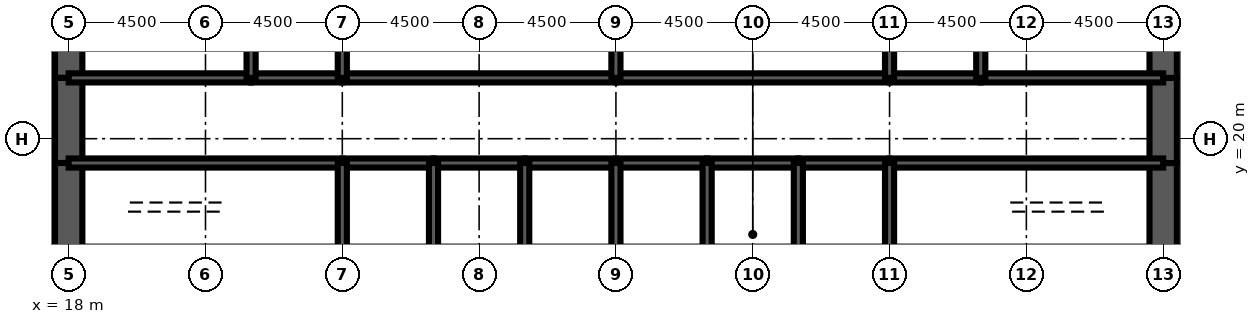
"""IFC4 building model, lengths in metres.
Left out: names, types, materials, properties, quantities, classifications, styles, units other than length and angle.
Written with IfcOpenShell. Run it as: python <this file> out.ifc"""

import sys

from ifc_helpers import new_model, si_unit, direction, frame, frame_2d, origin, place, context, subcontext, project, spatial, rectangle, extrude, element, fill, save


model = new_model("IFC4")
c1 = context("Model", 3, precision=1e-05, world=origin(), true_north=direction((0.0, 1.0)))
c2 = subcontext(c1, "Body", "Model", "MODEL_VIEW")
j1 = project(units=[si_unit("LENGTHUNIT", "METRE"), si_unit("PLANEANGLEUNIT", "RADIAN")], contexts=[c1])
p1 = place(None, origin())
s1 = spatial("IfcSite", under=j1, at=p1, CompositionType="ELEMENT")
p2 = place(p1, origin())
s2 = spatial("IfcBuilding", under=s1, at=p2, CompositionType="ELEMENT")
p3 = place(p2, frame((0.0, 0.0, 176.1)))
s3 = spatial("IfcBuildingStorey", under=s2, at=p3, CompositionType="ELEMENT", Elevation=176.1)
p4 = place(p3, frame((18.0, 26.0, 0.0), z_axis=(0.0, 0.0, 1.0), x_axis=(0.0, -1.0, 0.0)))
e1 = element("IfcWall", 1, at=p4, inside=s3, PredefinedType="SHEAR", context=c2, shape_type="SweptSolid", body=[
    extrude(rectangle(XDim=4.0, YDim=0.9, at=frame_2d((2.0, 0.0))), origin(), (0.0, 0.0, 1.0), 4.2),
])
p5 = place(p3, frame((18.0, 22.0, 0.0), z_axis=(0.0, 0.0, 1.0), x_axis=(0.0, -1.0, 0.0)))
e2 = element("IfcWall", 2, at=p5, inside=s3, PredefinedType="SHEAR", context=c2, shape_type="SweptSolid", body=[
    extrude(rectangle(XDim=2.8, YDim=0.9, at=frame_2d((1.4, 0.0))), origin(), (0.0, 0.0, 1.0), 4.2),
])
p6 = place(p5, frame((0.6, 0.0, 0.0)))
e3 = element("IfcOpeningElement", 3, at=p6, cuts=e2, PredefinedType="OPENING", context=c2, shape_type="SweptSolid", body=[
    extrude(rectangle(XDim=1.8, YDim=2.1, at=frame_2d((0.9, 1.05))), frame((0.0, 0.46, 0.0), z_axis=(0.0, -1.0, 0.0), x_axis=(1.0, 0.0, 0.0)), (0.0, 0.0, 1.0), 0.92),
])
for number, where, z_axis, x_axis in (
    (4, (18.0, 19.2, 0.0), (0.0, 0.0, 1.0), (0.0, -1.0, 0.0)),
    (5, (54.0, 16.0, 0.0), (0.0, 0.0, 1.0), (0.0, 1.0, 0.0)),
):
    element("IfcWall", number, at=place(p3, frame(where, z_axis=z_axis, x_axis=x_axis)), inside=s3, PredefinedType="SHEAR", context=c2, shape_type="SweptSolid", body=[
        extrude(rectangle(XDim=3.2, YDim=0.9, at=frame_2d((1.6, 0.0))), origin(), (0.0, 0.0, 1.0), 4.2),
    ])
p7 = place(p3, frame((54.0, 19.2, 0.0), z_axis=(0.0, 0.0, 1.0), x_axis=(0.0, 1.0, 0.0)))
e6 = element("IfcWall", 6, at=p7, inside=s3, PredefinedType="SHEAR", context=c2, shape_type="SweptSolid", body=[
    extrude(rectangle(XDim=2.8, YDim=0.9, at=frame_2d((1.4, 0.0))), origin(), (0.0, 0.0, 1.0), 4.2),
])
p8 = place(p7, frame((0.4, 0.0, 0.0)))
e7 = element("IfcOpeningElement", 7, at=p8, cuts=e6, PredefinedType="OPENING", context=c2, shape_type="SweptSolid", body=[
    extrude(rectangle(XDim=1.8, YDim=2.1, at=frame_2d((0.9, 1.05))), frame((0.0, 0.46, 0.0), z_axis=(0.0, -1.0, 0.0), x_axis=(1.0, 0.0, 0.0)), (0.0, 0.0, 1.0), 0.92),
])
p9 = place(p3, frame((54.0, 22.0, 0.0), z_axis=(0.0, 0.0, 1.0), x_axis=(0.0, 1.0, 0.0)))
e8 = element("IfcWall", 8, at=p9, inside=s3, PredefinedType="SHEAR", context=c2, shape_type="SweptSolid", body=[
    extrude(rectangle(XDim=4.0, YDim=0.9, at=frame_2d((2.0, 0.0))), origin(), (0.0, 0.0, 1.0), 4.2),
])
p10 = place(p3, frame((18.0, 19.2, 0.0), z_axis=(0.0, 0.0, 1.0), x_axis=(1.0, 0.0, 0.0)))
e9 = element("IfcWall", 9, at=p10, inside=s3, PredefinedType="SOLIDWALL", context=c2, shape_type="SweptSolid", body=[
    extrude(rectangle(XDim=9.0, YDim=0.3, at=frame_2d((4.5, 0.0))), origin(), (0.0, 0.0, 1.0), 4.2),
])
p11 = place(p10, frame((0.65, 0.0, 0.0)))
e10 = element("IfcOpeningElement", 10, at=p11, cuts=e9, PredefinedType="OPENING", context=c2, shape_type="SweptSolid", body=[
    extrude(rectangle(XDim=1.0, YDim=2.1, at=frame_2d((0.5, 1.05))), frame((0.0, 0.16, 0.0), z_axis=(0.0, -1.0, 0.0), x_axis=(1.0, 0.0, 0.0)), (0.0, 0.0, 1.0), 0.32),
])
p12 = place(p3, frame((27.0, 19.2, 0.0), z_axis=(0.0, 0.0, 1.0), x_axis=(1.0, 0.0, 0.0)))
e11 = element("IfcWall", 11, at=p12, inside=s3, PredefinedType="SOLIDWALL", context=c2, shape_type="SweptSolid", body=[
    extrude(rectangle(XDim=3.0, YDim=0.3, at=frame_2d((1.5, 0.0))), origin(), (0.0, 0.0, 1.0), 4.2),
])
p13 = place(p12, frame((0.95, 0.0, 0.0)))
e12 = element("IfcOpeningElement", 12, at=p13, cuts=e11, PredefinedType="OPENING", context=c2, shape_type="SweptSolid", body=[
    extrude(rectangle(XDim=1.1, YDim=2.2, at=frame_2d((0.55, 1.1))), frame((0.0, 0.16, 0.0), z_axis=(0.0, -1.0, 0.0), x_axis=(1.0, 0.0, 0.0)), (0.0, 0.0, 1.0), 0.32),
])
p14 = place(p3, frame((30.0, 19.2, 0.0), z_axis=(0.0, 0.0, 1.0), x_axis=(1.0, 0.0, 0.0)))
e13 = element("IfcWall", 13, at=p14, inside=s3, PredefinedType="SOLIDWALL", context=c2, shape_type="SweptSolid", body=[
    extrude(rectangle(XDim=3.0, YDim=0.3, at=frame_2d((1.5, 0.0))), origin(), (0.0, 0.0, 1.0), 4.2),
])
p15 = place(p14, frame((0.95, 0.0, 0.0)))
e14 = element("IfcOpeningElement", 14, at=p15, cuts=e13, PredefinedType="OPENING", context=c2, shape_type="SweptSolid", body=[
    extrude(rectangle(XDim=1.1, YDim=2.2, at=frame_2d((0.55, 1.1))), frame((0.0, 0.16, 0.0), z_axis=(0.0, -1.0, 0.0), x_axis=(1.0, 0.0, 0.0)), (0.0, 0.0, 1.0), 0.32),
])
p16 = place(p3, frame((33.0, 19.2, 0.0), z_axis=(0.0, 0.0, 1.0), x_axis=(1.0, 0.0, 0.0)))
e15 = element("IfcWall", 15, at=p16, inside=s3, PredefinedType="SOLIDWALL", context=c2, shape_type="SweptSolid", body=[
    extrude(rectangle(XDim=3.0, YDim=0.3, at=frame_2d((1.5, 0.0))), origin(), (0.0, 0.0, 1.0), 4.2),
])
p17 = place(p16, frame((0.95, 0.0, 0.0)))
e16 = element("IfcOpeningElement", 16, at=p17, cuts=e15, PredefinedType="OPENING", context=c2, shape_type="SweptSolid", body=[
    extrude(rectangle(XDim=1.1, YDim=2.2, at=frame_2d((0.55, 1.1))), frame((0.0, 0.16, 0.0), z_axis=(0.0, -1.0, 0.0), x_axis=(1.0, 0.0, 0.0)), (0.0, 0.0, 1.0), 0.32),
])
p18 = place(p3, frame((36.0, 19.2, 0.0), z_axis=(0.0, 0.0, 1.0), x_axis=(1.0, 0.0, 0.0)))
e17 = element("IfcWall", 17, at=p18, inside=s3, PredefinedType="SOLIDWALL", context=c2, shape_type="SweptSolid", body=[
    extrude(rectangle(XDim=3.0, YDim=0.3, at=frame_2d((1.5, 0.0))), origin(), (0.0, 0.0, 1.0), 4.2),
])
p19 = place(p18, frame((0.95, 0.0, 0.0)))
e18 = element("IfcOpeningElement", 18, at=p19, cuts=e17, PredefinedType="OPENING", context=c2, shape_type="SweptSolid", body=[
    extrude(rectangle(XDim=1.1, YDim=2.2, at=frame_2d((0.55, 1.1))), frame((0.0, 0.16, 0.0), z_axis=(0.0, -1.0, 0.0), x_axis=(1.0, 0.0, 0.0)), (0.0, 0.0, 1.0), 0.32),
])
p20 = place(p3, frame((39.0, 19.2, 0.0), z_axis=(0.0, 0.0, 1.0), x_axis=(1.0, 0.0, 0.0)))
e19 = element("IfcWall", 19, at=p20, inside=s3, PredefinedType="SOLIDWALL", context=c2, shape_type="SweptSolid", body=[
    extrude(rectangle(XDim=3.0, YDim=0.3, at=frame_2d((1.5, 0.0))), origin(), (0.0, 0.0, 1.0), 4.2),
])
p21 = place(p20, frame((1.0, 0.0, 0.0)))
e20 = element("IfcOpeningElement", 20, at=p21, cuts=e19, PredefinedType="OPENING", context=c2, shape_type="SweptSolid", body=[
    extrude(rectangle(XDim=1.0, YDim=2.1, at=frame_2d((0.5, 1.05))), frame((0.0, 0.16, 0.0), z_axis=(0.0, -1.0, 0.0), x_axis=(1.0, 0.0, 0.0)), (0.0, 0.0, 1.0), 0.32),
])
p22 = place(p3, frame((42.0, 19.2, 0.0), z_axis=(0.0, 0.0, 1.0), x_axis=(1.0, 0.0, 0.0)))
e21 = element("IfcWall", 21, at=p22, inside=s3, PredefinedType="SOLIDWALL", context=c2, shape_type="SweptSolid", body=[
    extrude(rectangle(XDim=3.0, YDim=0.3, at=frame_2d((1.5, 0.0))), origin(), (0.0, 0.0, 1.0), 4.2),
])
p23 = place(p3, frame((45.0, 19.2, 0.0), z_axis=(0.0, 0.0, 1.0), x_axis=(1.0, 0.0, 0.0)))
e22 = element("IfcWall", 22, at=p23, inside=s3, PredefinedType="SOLIDWALL", context=c2, shape_type="SweptSolid", body=[
    extrude(rectangle(XDim=9.0, YDim=0.3, at=frame_2d((4.5, 0.0))), origin(), (0.0, 0.0, 1.0), 4.2),
])
p24 = place(p23, frame((7.35, 0.0, 0.0)))
e23 = element("IfcOpeningElement", 23, at=p24, cuts=e22, PredefinedType="OPENING", context=c2, shape_type="SweptSolid", body=[
    extrude(rectangle(XDim=1.0, YDim=2.1, at=frame_2d((0.5, 1.05))), frame((0.0, 0.16, 0.0), z_axis=(0.0, -1.0, 0.0), x_axis=(1.0, 0.0, 0.0)), (0.0, 0.0, 1.0), 0.32),
])
p25 = place(p3, frame((18.0, 22.0, 0.0), z_axis=(0.0, 0.0, 1.0), x_axis=(1.0, 0.0, 0.0)))
e24 = element("IfcWall", 24, at=p25, inside=s3, PredefinedType="SOLIDWALL", context=c2, shape_type="SweptSolid", body=[
    extrude(rectangle(XDim=6.0, YDim=0.3, at=frame_2d((3.0, 0.0))), origin(), (0.0, 0.0, 1.0), 4.2),
])
p26 = place(p25, frame((4.4, 0.0, 0.0)))
e25 = element("IfcOpeningElement", 25, at=p26, cuts=e24, PredefinedType="OPENING", context=c2, shape_type="SweptSolid", body=[
    extrude(rectangle(XDim=1.0, YDim=2.1, at=frame_2d((0.5, 1.05))), frame((0.0, 0.16, 0.0), z_axis=(0.0, -1.0, 0.0), x_axis=(1.0, 0.0, 0.0)), (0.0, 0.0, 1.0), 0.32),
])
p27 = place(p25, frame((0.85, 0.0, 0.0)))
e26 = element("IfcOpeningElement", 26, at=p27, cuts=e24, PredefinedType="OPENING", context=c2, shape_type="SweptSolid", body=[
    extrude(rectangle(XDim=1.0, YDim=2.1, at=frame_2d((0.5, 1.05))), frame((0.0, 0.16, 0.0), z_axis=(0.0, -1.0, 0.0), x_axis=(1.0, 0.0, 0.0)), (0.0, 0.0, 1.0), 0.32),
])
p28 = place(p3, frame((24.0, 22.0, 0.0), z_axis=(0.0, 0.0, 1.0), x_axis=(1.0, 0.0, 0.0)))
e27 = element("IfcWall", 27, at=p28, inside=s3, PredefinedType="SOLIDWALL", context=c2, shape_type="SweptSolid", body=[
    extrude(rectangle(XDim=3.0, YDim=0.3, at=frame_2d((1.5, 0.0))), origin(), (0.0, 0.0, 1.0), 4.2),
])
p29 = place(p28, frame((1.0, 0.0, 0.0)))
e28 = element("IfcOpeningElement", 28, at=p29, cuts=e27, PredefinedType="OPENING", context=c2, shape_type="SweptSolid", body=[
    extrude(rectangle(XDim=1.0, YDim=2.1, at=frame_2d((0.5, 1.05))), frame((0.0, 0.16, 0.0), z_axis=(0.0, -1.0, 0.0), x_axis=(1.0, 0.0, 0.0)), (0.0, 0.0, 1.0), 0.32),
])
p30 = place(p3, frame((27.0, 22.0, 0.0), z_axis=(0.0, 0.0, 1.0), x_axis=(1.0, 0.0, 0.0)))
e29 = element("IfcWall", 29, at=p30, inside=s3, PredefinedType="SOLIDWALL", context=c2, shape_type="SweptSolid", body=[
    extrude(rectangle(XDim=9.0, YDim=0.3, at=frame_2d((4.5, 0.0))), origin(), (0.0, 0.0, 1.0), 4.2),
])
p31 = place(p30, frame((4.0, 0.0, 0.0)))
e30 = element("IfcOpeningElement", 30, at=p31, cuts=e29, PredefinedType="OPENING", context=c2, shape_type="SweptSolid", body=[
    extrude(rectangle(XDim=1.0, YDim=2.1, at=frame_2d((0.5, 1.05))), frame((0.0, 0.16, 0.0), z_axis=(0.0, -1.0, 0.0), x_axis=(1.0, 0.0, 0.0)), (0.0, 0.0, 1.0), 0.32),
])
p32 = place(p3, frame((36.0, 22.0, 0.0), z_axis=(0.0, 0.0, 1.0), x_axis=(1.0, 0.0, 0.0)))
e31 = element("IfcWall", 31, at=p32, inside=s3, PredefinedType="SOLIDWALL", context=c2, shape_type="SweptSolid", body=[
    extrude(rectangle(XDim=9.0, YDim=0.3, at=frame_2d((4.5, 0.0))), origin(), (0.0, 0.0, 1.0), 4.2),
])
p33 = place(p32, frame((4.0, 0.0, 0.0)))
e32 = element("IfcOpeningElement", 32, at=p33, cuts=e31, PredefinedType="OPENING", context=c2, shape_type="SweptSolid", body=[
    extrude(rectangle(XDim=1.0, YDim=2.1, at=frame_2d((0.5, 1.05))), frame((0.0, 0.16, 0.0), z_axis=(0.0, -1.0, 0.0), x_axis=(1.0, 0.0, 0.0)), (0.0, 0.0, 1.0), 0.32),
])
p34 = place(p3, frame((45.0, 22.0, 0.0), z_axis=(0.0, 0.0, 1.0), x_axis=(1.0, 0.0, 0.0)))
e33 = element("IfcWall", 33, at=p34, inside=s3, PredefinedType="SOLIDWALL", context=c2, shape_type="SweptSolid", body=[
    extrude(rectangle(XDim=3.0, YDim=0.3, at=frame_2d((1.5, 0.0))), origin(), (0.0, 0.0, 1.0), 4.2),
])
p35 = place(p34, frame((1.0, 0.0, 0.0)))
e34 = element("IfcOpeningElement", 34, at=p35, cuts=e33, PredefinedType="OPENING", context=c2, shape_type="SweptSolid", body=[
    extrude(rectangle(XDim=1.0, YDim=2.1, at=frame_2d((0.5, 1.05))), frame((0.0, 0.16, 0.0), z_axis=(0.0, -1.0, 0.0), x_axis=(1.0, 0.0, 0.0)), (0.0, 0.0, 1.0), 0.32),
])
p36 = place(p3, frame((48.0, 22.0, 0.0), z_axis=(0.0, 0.0, 1.0), x_axis=(1.0, 0.0, 0.0)))
e35 = element("IfcWall", 35, at=p36, inside=s3, PredefinedType="SOLIDWALL", context=c2, shape_type="SweptSolid", body=[
    extrude(rectangle(XDim=6.0, YDim=0.3, at=frame_2d((3.0, 0.0))), origin(), (0.0, 0.0, 1.0), 4.2),
])
p37 = place(p36, frame((2.0, 0.0, 0.0)))
e36 = element("IfcOpeningElement", 36, at=p37, cuts=e35, PredefinedType="OPENING", context=c2, shape_type="SweptSolid", body=[
    extrude(rectangle(XDim=1.0, YDim=2.1, at=frame_2d((0.5, 1.05))), frame((0.0, 0.16, 0.0), z_axis=(0.0, -1.0, 0.0), x_axis=(1.0, 0.0, 0.0)), (0.0, 0.0, 1.0), 0.32),
])
p38 = place(p36, frame((4.0, 0.0, 0.0)))
e37 = element("IfcOpeningElement", 37, at=p38, cuts=e35, PredefinedType="OPENING", context=c2, shape_type="SweptSolid", body=[
    extrude(rectangle(XDim=1.0, YDim=2.1, at=frame_2d((0.5, 1.05))), frame((0.0, 0.16, 0.0), z_axis=(0.0, -1.0, 0.0), x_axis=(1.0, 0.0, 0.0)), (0.0, 0.0, 1.0), 0.32),
])
for number, where, z_axis, x_axis in (
    (38, (27.0, 16.0, 0.0), (0.0, 0.0, 1.0), (0.0, 1.0, 0.0)),
    (39, (30.0, 16.0, 0.0), (0.0, 0.0, 1.0), (0.0, 1.0, 0.0)),
    (40, (33.0, 16.0, 0.0), (0.0, 0.0, 1.0), (0.0, 1.0, 0.0)),
    (41, (36.0, 16.0, 0.0), (0.0, 0.0, 1.0), (0.0, 1.0, 0.0)),
    (42, (39.0, 16.0, 0.0), (0.0, 0.0, 1.0), (0.0, 1.0, 0.0)),
    (43, (42.0, 16.0, 0.0), (0.0, 0.0, 1.0), (0.0, 1.0, 0.0)),
    (44, (45.0, 16.0, 0.0), (0.0, 0.0, 1.0), (0.0, 1.0, 0.0)),
):
    element("IfcWall", number, at=place(p3, frame(where, z_axis=z_axis, x_axis=x_axis)), inside=s3, PredefinedType="SOLIDWALL", context=c2, shape_type="SweptSolid", body=[
        extrude(rectangle(XDim=3.2, YDim=0.3, at=frame_2d((1.6, 0.0))), origin(), (0.0, 0.0, 1.0), 4.2),
    ])
for number, where, z_axis, x_axis in (
    (45, (24.0, 22.0, 0.0), (0.0, 0.0, 1.0), (0.0, 1.0, 0.0)),
    (46, (27.0, 22.0, 0.0), (0.0, 0.0, 1.0), (0.0, 1.0, 0.0)),
    (47, (36.0, 22.0, 0.0), (0.0, 0.0, 1.0), (0.0, 1.0, 0.0)),
    (48, (45.0, 22.0, 0.0), (0.0, 0.0, 1.0), (0.0, 1.0, 0.0)),
    (49, (48.0, 22.0, 0.0), (0.0, 0.0, 1.0), (0.0, 1.0, 0.0)),
):
    element("IfcWall", number, at=place(p3, frame(where, z_axis=z_axis, x_axis=x_axis)), inside=s3, PredefinedType="SOLIDWALL", context=c2, shape_type="SweptSolid", body=[
        extrude(rectangle(XDim=4.0, YDim=0.3, at=frame_2d((2.0, 0.0))), origin(), (0.0, 0.0, 1.0), 4.2),
    ])
p39 = place(p3, frame((39.15, 17.4, 0.0), z_axis=(0.0, 0.0, 1.0), x_axis=(1.0, 0.0, 0.0)))
e50 = element("IfcWall", 50, at=p39, inside=s3, PredefinedType="SOLIDWALL", context=c2, shape_type="SweptSolid", body=[
    extrude(rectangle(XDim=2.7, YDim=0.3, at=frame_2d((1.35, 0.0))), origin(), (0.0, 0.0, 1.0), 3.95),
])
p40 = place(p39, frame((0.85, 0.0, 0.0)))
e51 = element("IfcOpeningElement", 51, at=p40, cuts=e50, PredefinedType="OPENING", context=c2, shape_type="SweptSolid", body=[
    extrude(rectangle(XDim=1.0, YDim=2.1, at=frame_2d((0.5, 1.05))), frame((0.0, 0.16, 0.0), z_axis=(0.0, -1.0, 0.0), x_axis=(1.0, 0.0, 0.0)), (0.0, 0.0, 1.0), 0.32),
])
p41 = place(p3, frame((42.5, 22.15, 0.0), z_axis=(0.0, 0.0, 1.0), x_axis=(0.0, 1.0, 0.0)))
e52 = element("IfcWall", 52, at=p41, inside=s3, PredefinedType="PARTITIONING", context=c2, shape_type="SweptSolid", body=[
    extrude(rectangle(XDim=3.7, YDim=0.15, at=frame_2d((1.85, 0.0))), origin(), (0.0, 0.0, 1.0), 3.0),
])
p42 = place(p41, frame((2.2, 0.0, 0.0)))
e53 = element("IfcOpeningElement", 53, at=p42, cuts=e52, PredefinedType="OPENING", context=c2, shape_type="SweptSolid", body=[
    extrude(rectangle(XDim=1.0, YDim=2.1, at=frame_2d((0.5, 1.05))), frame((0.0, 0.085, 0.0), z_axis=(0.0, -1.0, 0.0), x_axis=(1.0, 0.0, 0.0)), (0.0, 0.0, 1.0), 0.17),
])
for number, where, z_axis, x_axis in (
    (54, (20.325, 22.15, 0.0), (0.0, 0.0, 1.0), (0.0, 1.0, 0.0)),
    (55, (51.375, 22.15, 0.0), (0.0, 0.0, 1.0), (0.0, 1.0, 0.0)),
):
    element("IfcWall", number, at=place(p3, frame(where, z_axis=z_axis, x_axis=x_axis)), inside=s3, PredefinedType="PARTITIONING", context=c2, shape_type="SweptSolid", body=[
        extrude(rectangle(XDim=3.7, YDim=0.15, at=frame_2d((1.85, 0.0))), origin(), (0.0, 0.0, 1.0), 3.0),
    ])
p43 = place(p40, origin())
e56 = element("IfcDoor", 56, at=p43, inside=s3, OperationType="SINGLE_SWING_LEFT", PredefinedType="DOOR", context=c2, shape_type="SweptSolid", body=[
    extrude(rectangle(XDim=1.0, YDim=2.1, at=frame_2d((0.5, 1.05))), frame((0.0, 0.025, 0.0), z_axis=(0.0, -1.0, 0.0), x_axis=(1.0, 0.0, 0.0)), (0.0, 0.0, 1.0), 0.05),
])
fill(e51, e56)
p44 = place(p13, origin())
e57 = element("IfcDoor", 57, at=p44, inside=s3, OperationType="DOUBLE_DOOR_SLIDING", PredefinedType="USERDEFINED", context=c2, shape_type="SweptSolid", body=[
    extrude(rectangle(XDim=1.1, YDim=2.2, at=frame_2d((0.55, 1.1))), frame((0.0, 0.025, 0.0), z_axis=(0.0, -1.0, 0.0), x_axis=(1.0, 0.0, 0.0)), (0.0, 0.0, 1.0), 0.05),
])
fill(e12, e57)
p45 = place(p15, origin())
e58 = element("IfcDoor", 58, at=p45, inside=s3, OperationType="DOUBLE_DOOR_SLIDING", PredefinedType="USERDEFINED", context=c2, shape_type="SweptSolid", body=[
    extrude(rectangle(XDim=1.1, YDim=2.2, at=frame_2d((0.55, 1.1))), frame((0.0, 0.025, 0.0), z_axis=(0.0, -1.0, 0.0), x_axis=(1.0, 0.0, 0.0)), (0.0, 0.0, 1.0), 0.05),
])
fill(e14, e58)
p46 = place(p17, origin())
e59 = element("IfcDoor", 59, at=p46, inside=s3, OperationType="DOUBLE_DOOR_SLIDING", PredefinedType="USERDEFINED", context=c2, shape_type="SweptSolid", body=[
    extrude(rectangle(XDim=1.1, YDim=2.2, at=frame_2d((0.55, 1.1))), frame((0.0, 0.025, 0.0), z_axis=(0.0, -1.0, 0.0), x_axis=(1.0, 0.0, 0.0)), (0.0, 0.0, 1.0), 0.05),
])
fill(e16, e59)
p47 = place(p19, origin())
e60 = element("IfcDoor", 60, at=p47, inside=s3, OperationType="DOUBLE_DOOR_SLIDING", PredefinedType="USERDEFINED", context=c2, shape_type="SweptSolid", body=[
    extrude(rectangle(XDim=1.1, YDim=2.2, at=frame_2d((0.55, 1.1))), frame((0.0, 0.025, 0.0), z_axis=(0.0, -1.0, 0.0), x_axis=(1.0, 0.0, 0.0)), (0.0, 0.0, 1.0), 0.05),
])
fill(e18, e60)
p48 = place(p11, origin())
e61 = element("IfcDoor", 61, at=p48, inside=s3, OperationType="SINGLE_SWING_LEFT", PredefinedType="DOOR", context=c2, shape_type="SweptSolid", body=[
    extrude(rectangle(XDim=1.0, YDim=2.1, at=frame_2d((0.5, 1.05))), frame((0.0, 0.025, 0.0), z_axis=(0.0, -1.0, 0.0), x_axis=(1.0, 0.0, 0.0)), (0.0, 0.0, 1.0), 0.05),
])
fill(e10, e61)
p49 = place(p24, origin())
e62 = element("IfcDoor", 62, at=p49, inside=s3, OperationType="SINGLE_SWING_RIGHT", PredefinedType="DOOR", context=c2, shape_type="SweptSolid", body=[
    extrude(rectangle(XDim=1.0, YDim=2.1, at=frame_2d((0.5, 1.05))), frame((0.0, 0.025, 0.0), z_axis=(0.0, -1.0, 0.0), x_axis=(1.0, 0.0, 0.0)), (0.0, 0.0, 1.0), 0.05),
])
fill(e23, e62)
p50 = place(p6, origin())
e63 = element("IfcDoor", 63, at=p50, inside=s3, OperationType="SINGLE_SWING_LEFT", PredefinedType="DOOR", context=c2, shape_type="SweptSolid", body=[
    extrude(rectangle(XDim=1.8, YDim=2.1, at=frame_2d((0.9, 1.05))), frame((0.0, 0.45, 0.0), z_axis=(0.0, -1.0, 0.0), x_axis=(1.0, 0.0, 0.0)), (0.0, 0.0, 1.0), 0.899),
])
fill(e3, e63)
p51 = place(p8, origin())
e64 = element("IfcDoor", 64, at=p51, inside=s3, OperationType="SINGLE_SWING_LEFT", PredefinedType="DOOR", context=c2, shape_type="SweptSolid", body=[
    extrude(rectangle(XDim=1.8, YDim=2.1, at=frame_2d((0.9, 1.05))), frame((0.0, 0.45, 0.0), z_axis=(0.0, -1.0, 0.0), x_axis=(1.0, 0.0, 0.0)), (0.0, 0.0, 1.0), 0.899),
])
fill(e7, e64)
p52 = place(p26, origin())
e65 = element("IfcDoor", 65, at=p52, inside=s3, OperationType="SINGLE_SWING_RIGHT", PredefinedType="DOOR", context=c2, shape_type="SweptSolid", body=[
    extrude(rectangle(XDim=1.0, YDim=2.1, at=frame_2d((0.5, 1.05))), frame((0.0, 0.025, 0.0), z_axis=(0.0, -1.0, 0.0), x_axis=(1.0, 0.0, 0.0)), (0.0, 0.0, 1.0), 0.05),
])
fill(e25, e65)
p53 = place(p29, origin())
e66 = element("IfcDoor", 66, at=p53, inside=s3, OperationType="SINGLE_SWING_LEFT", PredefinedType="DOOR", context=c2, shape_type="SweptSolid", body=[
    extrude(rectangle(XDim=1.0, YDim=2.1, at=frame_2d((0.5, 1.05))), frame((0.0, 0.025, 0.0), z_axis=(0.0, -1.0, 0.0), x_axis=(1.0, 0.0, 0.0)), (0.0, 0.0, 1.0), 0.05),
])
fill(e28, e66)
p54 = place(p31, origin())
e67 = element("IfcDoor", 67, at=p54, inside=s3, OperationType="SINGLE_SWING_LEFT", PredefinedType="DOOR", context=c2, shape_type="SweptSolid", body=[
    extrude(rectangle(XDim=1.0, YDim=2.1, at=frame_2d((0.5, 1.05))), frame((0.0, 0.025, 0.0), z_axis=(0.0, -1.0, 0.0), x_axis=(1.0, 0.0, 0.0)), (0.0, 0.0, 1.0), 0.05),
])
fill(e30, e67)
p55 = place(p33, origin())
e68 = element("IfcDoor", 68, at=p55, inside=s3, OperationType="SINGLE_SWING_LEFT", PredefinedType="DOOR", context=c2, shape_type="SweptSolid", body=[
    extrude(rectangle(XDim=1.0, YDim=2.1, at=frame_2d((0.5, 1.05))), frame((0.0, 0.025, 0.0), z_axis=(0.0, -1.0, 0.0), x_axis=(1.0, 0.0, 0.0)), (0.0, 0.0, 1.0), 0.05),
])
fill(e32, e68)
p56 = place(p35, origin())
e69 = element("IfcDoor", 69, at=p56, inside=s3, OperationType="SINGLE_SWING_LEFT", PredefinedType="DOOR", context=c2, shape_type="SweptSolid", body=[
    extrude(rectangle(XDim=1.0, YDim=2.1, at=frame_2d((0.5, 1.05))), frame((0.0, 0.025, 0.0), z_axis=(0.0, -1.0, 0.0), x_axis=(1.0, 0.0, 0.0)), (0.0, 0.0, 1.0), 0.05),
])
fill(e34, e69)
p57 = place(p37, origin())
e70 = element("IfcDoor", 70, at=p57, inside=s3, OperationType="SINGLE_SWING_LEFT", PredefinedType="DOOR", context=c2, shape_type="SweptSolid", body=[
    extrude(rectangle(XDim=1.0, YDim=2.1, at=frame_2d((0.5, 1.05))), frame((0.0, 0.025, 0.0), z_axis=(0.0, -1.0, 0.0), x_axis=(1.0, 0.0, 0.0)), (0.0, 0.0, 1.0), 0.05),
])
fill(e36, e70)
p58 = place(p27, origin())
e71 = element("IfcDoor", 71, at=p58, inside=s3, OperationType="SINGLE_SWING_LEFT", PredefinedType="DOOR", context=c2, shape_type="SweptSolid", body=[
    extrude(rectangle(XDim=1.0, YDim=2.1, at=frame_2d((0.5, 1.05))), frame((0.0, 0.025, 0.0), z_axis=(0.0, -1.0, 0.0), x_axis=(1.0, 0.0, 0.0)), (0.0, 0.0, 1.0), 0.05),
])
fill(e26, e71)
p59 = place(p38, origin())
e72 = element("IfcDoor", 72, at=p59, inside=s3, OperationType="SINGLE_SWING_RIGHT", PredefinedType="DOOR", context=c2, shape_type="SweptSolid", body=[
    extrude(rectangle(XDim=1.0, YDim=2.1, at=frame_2d((0.5, 1.05))), frame((0.0, 0.025, 0.0), z_axis=(0.0, -1.0, 0.0), x_axis=(1.0, 0.0, 0.0)), (0.0, 0.0, 1.0), 0.05),
])
fill(e37, e72)
p60 = place(p21, origin())
e73 = element("IfcDoor", 73, at=p60, inside=s3, OperationType="SINGLE_SWING_LEFT", PredefinedType="DOOR", context=c2, shape_type="SweptSolid", body=[
    extrude(rectangle(XDim=1.0, YDim=2.1, at=frame_2d((0.5, 1.05))), frame((0.0, 0.025, 0.0), z_axis=(0.0, -1.0, 0.0), x_axis=(1.0, 0.0, 0.0)), (0.0, 0.0, 1.0), 0.05),
])
fill(e20, e73)
save(model, sys.argv[1])
